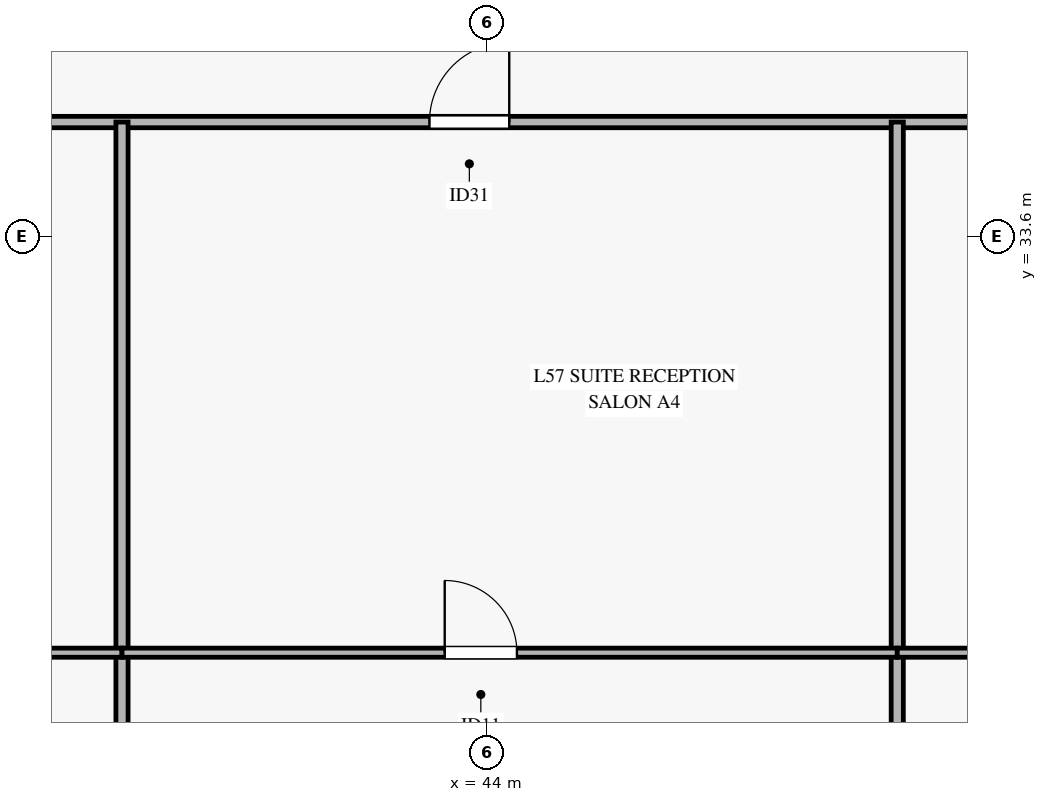
"""IFC4 building model, lengths in metres.
Left out: names, types, materials, properties, quantities, classifications, styles, units other than length and angle.
Written with IfcOpenShell. Run it as: python <this file> out.ifc"""

import sys

from ifc_helpers import new_model, si_unit, direction, frame, frame_2d, origin, place, context, subcontext, project, spatial, rectangle, extrude, source, transform, mapped, element, fill, save


model = new_model("IFC4")
c1 = context("Model", 3, precision=1e-05, world=origin(), true_north=direction((0.0, 1.0)))
c2 = subcontext(c1, "Body", "Model", "MODEL_VIEW")
j1 = project(units=[si_unit("LENGTHUNIT", "METRE"), si_unit("PLANEANGLEUNIT", "RADIAN")], contexts=[c1])
p1 = place(None, origin())
s1 = spatial("IfcSite", under=j1, at=p1, CompositionType="ELEMENT")
p2 = place(p1, origin())
s2 = spatial("IfcBuilding", under=s1, at=p2, CompositionType="ELEMENT")
p3 = place(p2, frame((0.0, 0.0, 227.0)))
s3 = spatial("IfcBuildingStorey", under=s2, at=p3, CompositionType="ELEMENT", Elevation=227.0)
p4 = place(p3, frame((7.533, 35.1, 0.0), z_axis=(0.0, 0.0, 1.0), x_axis=(1.0, 0.0, 0.0)))
e1 = element("IfcWall", 1, at=p4, inside=s3, PredefinedType="PARTITIONING", context=c2, shape_type="SweptSolid", body=[
    extrude(rectangle(XDim=55.334, YDim=0.15, at=frame_2d((27.667, 0.0))), origin(), (0.0, 0.0, 1.0), 2.37),
])
p5 = place(p4, frame((5.335, 0.0, 0.0)))
e2 = element("IfcOpeningElement", 2, at=p5, cuts=e1, PredefinedType="OPENING", context=c2, shape_type="SweptSolid", body=[
    extrude(rectangle(XDim=1.05, YDim=2.15, at=frame_2d((0.525, 1.075))), frame((0.0, 0.085, 0.0), z_axis=(0.0, -1.0, 0.0), x_axis=(1.0, 0.0, 0.0)), (0.0, 0.0, 1.0), 0.17),
])
p6 = place(p4, frame((17.207, 0.0, 0.0)))
e3 = element("IfcOpeningElement", 3, at=p6, cuts=e1, PredefinedType="OPENING", context=c2, shape_type="SweptSolid", body=[
    extrude(rectangle(XDim=1.05, YDim=2.15, at=frame_2d((0.525, 1.075))), frame((0.0, 0.085, 0.0), z_axis=(0.0, -1.0, 0.0), x_axis=(1.0, 0.0, 0.0)), (0.0, 0.0, 1.0), 0.17),
])
p7 = place(p4, frame((25.884, 0.0, 0.0)))
e4 = element("IfcOpeningElement", 4, at=p7, cuts=e1, PredefinedType="OPENING", context=c2, shape_type="SweptSolid", body=[
    extrude(rectangle(XDim=1.05, YDim=2.15, at=frame_2d((0.525, 1.075))), frame((0.0, 0.085, 0.0), z_axis=(0.0, -1.0, 0.0), x_axis=(1.0, 0.0, 0.0)), (0.0, 0.0, 1.0), 0.17),
])
p8 = place(p4, frame((35.712, 0.0, 0.0)))
e5 = element("IfcOpeningElement", 5, at=p8, cuts=e1, PredefinedType="OPENING", context=c2, shape_type="SweptSolid", body=[
    extrude(rectangle(XDim=1.05, YDim=2.15, at=frame_2d((0.525, 1.075))), frame((0.0, 0.085, 0.0), z_axis=(0.0, -1.0, 0.0), x_axis=(1.0, 0.0, 0.0)), (0.0, 0.0, 1.0), 0.17),
])
p9 = place(p4, frame((47.078, 0.0, 0.0)))
e6 = element("IfcOpeningElement", 6, at=p9, cuts=e1, PredefinedType="OPENING", context=c2, shape_type="SweptSolid", body=[
    extrude(rectangle(XDim=1.05, YDim=2.15, at=frame_2d((0.525, 1.075))), frame((0.0, 0.085, 0.0), z_axis=(0.0, -1.0, 0.0), x_axis=(1.0, 0.0, 0.0)), (0.0, 0.0, 1.0), 0.17),
])
for number, where, z_axis, x_axis in (
    (7, (39.2, 13.25, 0.0), (0.0, 0.0, 1.0), (0.0, 1.0, 0.0)),
    (8, (49.4, 13.25, 0.0), (0.0, 0.0, 1.0), (0.0, 1.0, 0.0)),
):
    element("IfcWall", number, at=place(p3, frame(where, z_axis=z_axis, x_axis=x_axis)), inside=s3, PredefinedType="PARTITIONING", context=c2, shape_type="SweptSolid", body=[
        extrude(rectangle(XDim=21.85, YDim=0.16, at=frame_2d((10.925, 0.0))), origin(), (0.0, 0.0, 1.0), 2.77),
    ])
p10 = place(p3, frame((29.6, 28.118, 0.0), z_axis=(0.0, 0.0, 1.0), x_axis=(1.0, 0.0, 0.0)))
e9 = element("IfcWall", 9, at=p10, inside=s3, PredefinedType="PARTITIONING", context=c2, shape_type="SweptSolid", body=[
    extrude(rectangle(XDim=9.6, YDim=0.12, at=frame_2d((4.8, 0.0))), origin(), (0.0, 0.0, 1.0), 2.37),
])
p11 = place(p10, frame((4.006, 0.0, 0.0)))
e10 = element("IfcOpeningElement", 10, at=p11, cuts=e9, PredefinedType="OPENING", context=c2, shape_type="SweptSolid", body=[
    extrude(rectangle(XDim=0.95, YDim=2.1, at=frame_2d((0.475, 1.05))), frame((0.0, 0.07, 0.0), z_axis=(0.0, -1.0, 0.0), x_axis=(1.0, 0.0, 0.0)), (0.0, 0.0, 1.0), 0.14),
])
p12 = place(p3, frame((39.2, 28.118, 0.0), z_axis=(0.0, 0.0, 1.0), x_axis=(1.0, 0.0, 0.0)))
e11 = element("IfcWall", 11, at=p12, inside=s3, PredefinedType="PARTITIONING", context=c2, shape_type="SweptSolid", body=[
    extrude(rectangle(XDim=10.2, YDim=0.12, at=frame_2d((5.1, 0.0))), origin(), (0.0, 0.0, 1.0), 2.37),
])
p13 = place(p12, frame((4.246, 0.0, 0.0)))
e12 = element("IfcOpeningElement", 12, at=p13, cuts=e11, PredefinedType="OPENING", context=c2, shape_type="SweptSolid", body=[
    extrude(rectangle(XDim=0.95, YDim=2.1, at=frame_2d((0.475, 1.05))), frame((0.0, 0.07, 0.0), z_axis=(0.0, -1.0, 0.0), x_axis=(1.0, 0.0, 0.0)), (0.0, 0.0, 1.0), 0.14),
])
p14 = place(p3, frame((49.4, 28.118, 0.0), z_axis=(0.0, 0.0, 1.0), x_axis=(1.0, 0.0, 0.0)))
e13 = element("IfcWall", 13, at=p14, inside=s3, PredefinedType="PARTITIONING", context=c2, shape_type="SweptSolid", body=[
    extrude(rectangle(XDim=13.467, YDim=0.12, at=frame_2d((6.733, 0.0))), origin(), (0.0, 0.0, 1.0), 2.37),
])
p15 = place(p14, frame((5.473, 0.0, 0.0)))
e14 = element("IfcOpeningElement", 14, at=p15, cuts=e13, PredefinedType="OPENING", context=c2, shape_type="SweptSolid", body=[
    extrude(rectangle(XDim=0.95, YDim=2.1, at=frame_2d((0.475, 1.05))), frame((0.0, 0.07, 0.0), z_axis=(0.0, -1.0, 0.0), x_axis=(1.0, 0.0, 0.0)), (0.0, 0.0, 1.0), 0.14),
])
m1 = source(origin(), c2, "Body", "SweptSolid", [
    extrude(rectangle(XDim=1.05, YDim=2.15, at=frame_2d((0.525, 1.075))), frame((0.0, 0.025, 0.0), z_axis=(0.0, -1.0, 0.0), x_axis=(1.0, 0.0, 0.0)), (0.0, 0.0, 1.0), 0.05),
])
p16 = place(p8, origin())
e15 = element("IfcDoor", 15, at=p16, inside=s3, OperationType="SINGLE_SWING_RIGHT", PredefinedType="DOOR", context=c2, shape_type="MappedRepresentation", body=[
    mapped(m1, transform((0.0, 0.0, 0.0), x_axis=(1.0, 0.0, 0.0), y_axis=(0.0, 1.0, 0.0), z_axis=(0.0, 0.0, 1.0), scale=1.0)),
])
fill(e5, e15)
m2 = source(origin(), c2, "Body", "SweptSolid", [
    extrude(rectangle(XDim=0.95, YDim=2.1, at=frame_2d((0.475, 1.05))), frame((0.0, 0.025, 0.0), z_axis=(0.0, -1.0, 0.0), x_axis=(1.0, 0.0, 0.0)), (0.0, 0.0, 1.0), 0.05),
])
p17 = place(p13, origin())
e16 = element("IfcDoor", 16, at=p17, inside=s3, OperationType="SINGLE_SWING_LEFT", PredefinedType="DOOR", context=c2, shape_type="MappedRepresentation", body=[
    mapped(m2, transform((0.0, 0.0, 0.0), x_axis=(1.0, 0.0, 0.0), y_axis=(0.0, 1.0, 0.0), z_axis=(0.0, 0.0, 1.0), scale=1.0)),
])
fill(e12, e16)
save(model, sys.argv[1])
